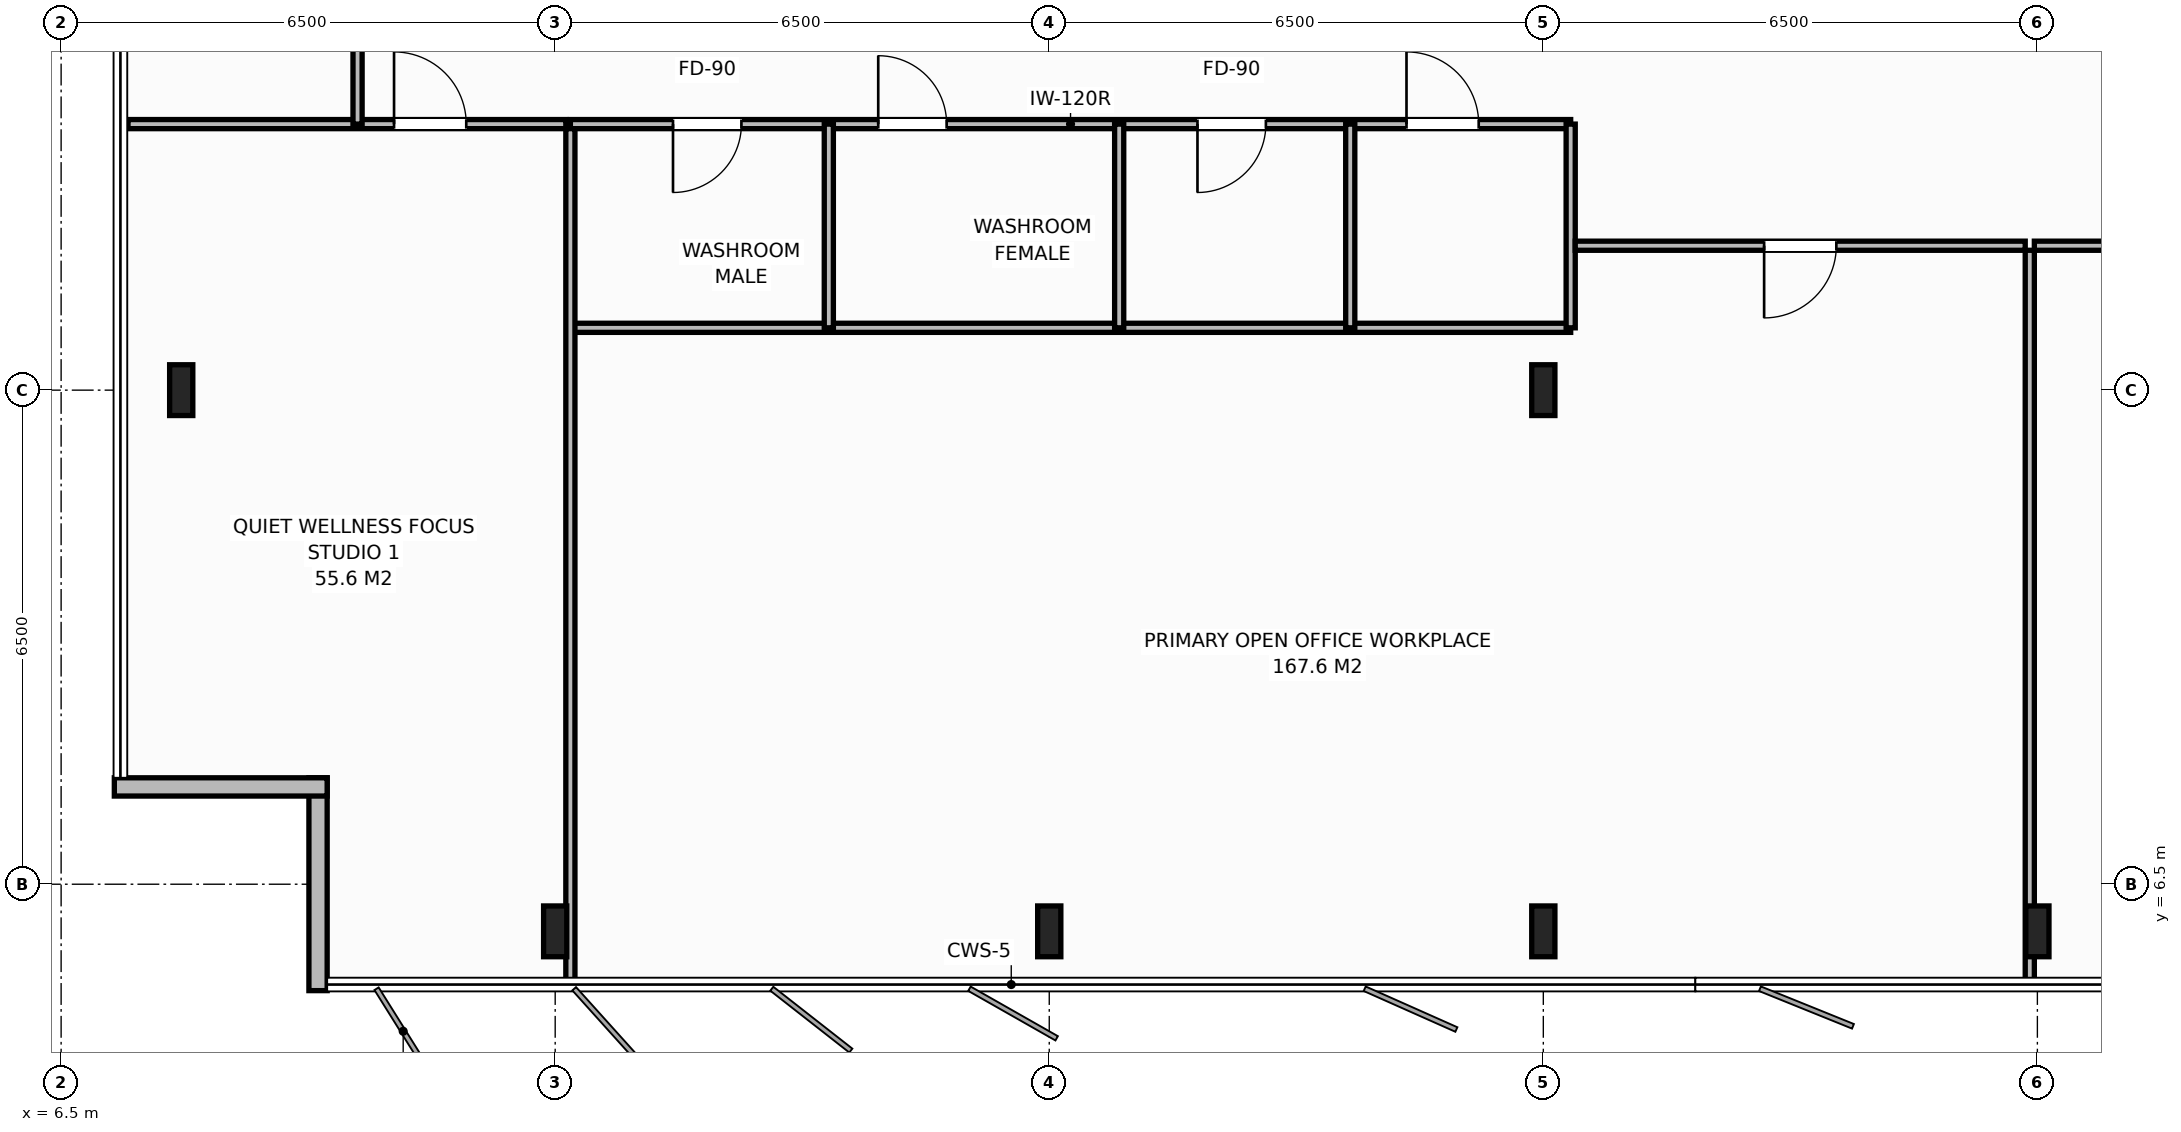
"""IFC4 building model, lengths in metres.
Left out: names, types, materials, properties, quantities, classifications, styles, units other than length and angle.
Written with IfcOpenShell. Run it as: python <this file> out.ifc"""

import sys

from ifc_helpers import new_model, si_unit, direction, frame, frame_2d, origin, origin_2d, place, context, subcontext, project, spatial, rectangle, i_section, extrude, element, fill, save


model = new_model("IFC4")
c1 = context("Model", 3, precision=1e-05, world=origin(), true_north=direction((0.0, 1.0)))
c2 = subcontext(c1, "Body", "Model", "MODEL_VIEW")
j1 = project(units=[si_unit("LENGTHUNIT", "METRE"), si_unit("PLANEANGLEUNIT", "RADIAN")], contexts=[c1])
p1 = place(None, origin())
s1 = spatial("IfcSite", under=j1, at=p1, CompositionType="ELEMENT")
p2 = place(p1, origin())
s2 = spatial("IfcBuilding", under=s1, at=p2, CompositionType="ELEMENT")
p3 = place(p2, frame((0.0, 0.0, 267.0)))
s3 = spatial("IfcBuildingStorey", under=s2, at=p3, CompositionType="ELEMENT", Elevation=267.0)
for number, where, z_axis, x_axis in (
    (1, (26.0, 13.0, 0.0), (0.0, 0.0, 1.0), (1.0, 0.0, 0.0)),
    (2, (13.0, 5.88, 0.0), (0.0, 0.0, 1.0), (1.0, 0.0, 0.0)),
    (3, (19.5, 5.88, 0.0), (0.0, 0.0, 1.0), (1.0, 0.0, 0.0)),
    (4, (26.0, 5.88, 0.0), (0.0, 0.0, 1.0), (1.0, 0.0, 0.0)),
    (5, (32.5, 5.88, 0.0), (0.0, 0.0, 1.0), (1.0, 0.0, 0.0)),
    (6, (8.08, 13.0, 0.0), (0.0, 0.0, 1.0), (1.0, 0.0, 0.0)),
):
    element("IfcColumn", number, at=place(p3, frame(where, z_axis=z_axis, x_axis=x_axis)), inside=s3, PredefinedType="COLUMN", context=c2, shape_type="SweptSolid", body=[
        extrude(i_section(OverallWidth=0.305, OverallDepth=0.668, WebThickness=0.021, FlangeThickness=0.04, at=origin_2d()), origin(), (0.0, 0.0, 1.0), 3.8),
    ])
p4 = place(p3, frame((9.88, 5.1, 0.0), z_axis=(0.0, 0.0, 1.0), x_axis=(0.0, 1.0, 0.0)))
e7 = element("IfcWall", 7, at=p4, inside=s3, PredefinedType="STANDARD", context=c2, shape_type="SweptSolid", body=[
    extrude(rectangle(XDim=2.8, YDim=0.24, at=frame_2d((1.4, 0.0))), origin(), (0.0, 0.0, 1.0), 3.588),
])
p5 = place(p3, frame((10.0, 7.78, 0.0), z_axis=(0.0, 0.0, 1.0), x_axis=(-1.0, 0.0, 0.0)))
e8 = element("IfcWall", 8, at=p5, inside=s3, PredefinedType="STANDARD", context=c2, shape_type="SweptSolid", body=[
    extrude(rectangle(XDim=2.8, YDim=0.24, at=frame_2d((1.4, 0.0))), origin(), (0.0, 0.0, 1.0), 3.588),
])
p6 = place(p3, frame((13.2, 16.5, 0.0), z_axis=(0.0, 0.0, 1.0), x_axis=(1.0, 0.0, 0.0)))
e9 = element("IfcWall", 9, at=p6, inside=s3, PredefinedType="PARTITIONING", context=c2, shape_type="SweptSolid", body=[
    extrude(rectangle(XDim=13.16, YDim=0.12, at=frame_2d((6.58, 0.0))), origin(), (0.0, 0.0, 1.0), 3.588),
])
p7 = place(p6, frame((1.35, 0.0, 0.0)))
e10 = element("IfcOpeningElement", 10, at=p7, cuts=e9, PredefinedType="OPENING", context=c2, shape_type="SweptSolid", body=[
    extrude(rectangle(XDim=0.9, YDim=2.15, at=frame_2d((0.45, 1.075))), frame((0.0, 0.07, 0.0), z_axis=(0.0, -1.0, 0.0), x_axis=(1.0, 0.0, 0.0)), (0.0, 0.0, 1.0), 0.14),
])
p8 = place(p6, frame((4.05, 0.0, 0.0)))
e11 = element("IfcOpeningElement", 11, at=p8, cuts=e9, PredefinedType="OPENING", context=c2, shape_type="SweptSolid", body=[
    extrude(rectangle(XDim=0.9, YDim=2.15, at=frame_2d((0.45, 1.075))), frame((0.0, 0.07, 0.0), z_axis=(0.0, -1.0, 0.0), x_axis=(1.0, 0.0, 0.0)), (0.0, 0.0, 1.0), 0.14),
])
p9 = place(p6, frame((8.25, 0.0, 0.0)))
e12 = element("IfcOpeningElement", 12, at=p9, cuts=e9, PredefinedType="OPENING", context=c2, shape_type="SweptSolid", body=[
    extrude(rectangle(XDim=0.9, YDim=2.15, at=frame_2d((0.45, 1.075))), frame((0.0, 0.07, 0.0), z_axis=(0.0, -1.0, 0.0), x_axis=(1.0, 0.0, 0.0)), (0.0, 0.0, 1.0), 0.14),
])
p10 = place(p6, frame((11.0, 0.0, 0.0)))
e13 = element("IfcOpeningElement", 13, at=p10, cuts=e9, PredefinedType="OPENING", context=c2, shape_type="SweptSolid", body=[
    extrude(rectangle(XDim=0.95, YDim=2.15, at=frame_2d((0.475, 1.075))), frame((0.0, 0.07, 0.0), z_axis=(0.0, -1.0, 0.0), x_axis=(1.0, 0.0, 0.0)), (0.0, 0.0, 1.0), 0.14),
])
p11 = place(p3, frame((13.2, 13.82, 0.0), z_axis=(0.0, 0.0, 1.0), x_axis=(1.0, 0.0, 0.0)))
e14 = element("IfcWall", 14, at=p11, inside=s3, PredefinedType="PARTITIONING", context=c2, shape_type="SweptSolid", body=[
    extrude(rectangle(XDim=13.16, YDim=0.12, at=frame_2d((6.58, 0.0))), origin(), (0.0, 0.0, 1.0), 3.588),
])
for number, where, z_axis, x_axis in (
    (15, (16.6, 13.82, 0.0), (0.0, 0.0, 1.0), (0.0, 1.0, 0.0)),
    (16, (20.42, 13.82, 0.0), (0.0, 0.0, 1.0), (0.0, 1.0, 0.0)),
    (17, (23.46, 13.82, 0.0), (0.0, 0.0, 1.0), (0.0, 1.0, 0.0)),
    (18, (26.36, 13.82, 0.0), (0.0, 0.0, 1.0), (0.0, 1.0, 0.0)),
):
    element("IfcWall", number, at=place(p3, frame(where, z_axis=z_axis, x_axis=x_axis)), inside=s3, PredefinedType="PARTITIONING", context=c2, shape_type="SweptSolid", body=[
        extrude(rectangle(XDim=2.68, YDim=0.12, at=frame_2d((1.34, 0.0))), origin(), (0.0, 0.0, 1.0), 3.588),
    ])
p12 = place(p3, frame((13.2, 5.12, 0.0), z_axis=(0.0, 0.0, 1.0), x_axis=(0.0, 1.0, 0.0)))
e19 = element("IfcWall", 19, at=p12, inside=s3, PredefinedType="PARTITIONING", context=c2, shape_type="SweptSolid", body=[
    extrude(rectangle(XDim=11.32, YDim=0.12, at=frame_2d((5.66, 0.0))), origin(), (0.0, 0.0, 1.0), 2.788),
])
p13 = place(p3, frame((7.38, 16.5, 0.0), z_axis=(0.0, 0.0, 1.0), x_axis=(1.0, 0.0, 0.0)))
e20 = element("IfcWall", 20, at=p13, inside=s3, PredefinedType="PARTITIONING", context=c2, shape_type="SweptSolid", body=[
    extrude(rectangle(XDim=5.76, YDim=0.12, at=frame_2d((2.88, 0.0))), origin(), (0.0, 0.0, 1.0), 3.588),
])
p14 = place(p13, frame((3.5, 0.0, 0.0)))
e21 = element("IfcOpeningElement", 21, at=p14, cuts=e20, PredefinedType="OPENING", context=c2, shape_type="SweptSolid", body=[
    extrude(rectangle(XDim=0.95, YDim=2.15, at=frame_2d((0.475, 1.075))), frame((0.0, 0.07, 0.0), z_axis=(0.0, -1.0, 0.0), x_axis=(1.0, 0.0, 0.0)), (0.0, 0.0, 1.0), 0.14),
])
p15 = place(p3, frame((32.4, 5.12, 0.0), z_axis=(0.0, 0.0, 1.0), x_axis=(0.0, 1.0, 0.0)))
e22 = element("IfcWall", 22, at=p15, inside=s3, PredefinedType="PARTITIONING", context=c2, shape_type="SweptSolid", body=[
    extrude(rectangle(XDim=9.72, YDim=0.12, at=frame_2d((4.86, 0.0))), origin(), (0.0, 0.0, 1.0), 2.788),
])
p16 = place(p3, frame((26.42, 14.9, 0.0), z_axis=(0.0, 0.0, 1.0), x_axis=(1.0, 0.0, 0.0)))
e23 = element("IfcWall", 23, at=p16, inside=s3, PredefinedType="PARTITIONING", context=c2, shape_type="SweptSolid", body=[
    extrude(rectangle(XDim=5.92, YDim=0.12, at=frame_2d((2.96, 0.0))), origin(), (0.0, 0.0, 1.0), 3.588),
])
p17 = place(p16, frame((2.485, 0.0, 0.0)))
e24 = element("IfcOpeningElement", 24, at=p17, cuts=e23, PredefinedType="OPENING", context=c2, shape_type="SweptSolid", body=[
    extrude(rectangle(XDim=0.95, YDim=2.15, at=frame_2d((0.475, 1.075))), frame((0.0, 0.07, 0.0), z_axis=(0.0, -1.0, 0.0), x_axis=(1.0, 0.0, 0.0)), (0.0, 0.0, 1.0), 0.14),
])
p18 = place(p3, frame((32.46, 14.9, 0.0), z_axis=(0.0, 0.0, 1.0), x_axis=(1.0, 0.0, 0.0)))
e25 = element("IfcWall", 25, at=p18, inside=s3, PredefinedType="PARTITIONING", context=c2, shape_type="SweptSolid", body=[
    extrude(rectangle(XDim=3.445, YDim=0.12, at=frame_2d((1.722, 0.0))), origin(), (0.0, 0.0, 1.0), 3.588),
])
p19 = place(p18, frame((1.247, 0.0, 0.0)))
e26 = element("IfcOpeningElement", 26, at=p19, cuts=e25, PredefinedType="OPENING", context=c2, shape_type="SweptSolid", body=[
    extrude(rectangle(XDim=0.95, YDim=2.15, at=frame_2d((0.475, 1.075))), frame((0.0, 0.07, 0.0), z_axis=(0.0, -1.0, 0.0), x_axis=(1.0, 0.0, 0.0)), (0.0, 0.0, 1.0), 0.14),
])
p20 = place(p3, frame((10.4, 16.5, 0.0), z_axis=(0.0, 0.0, 1.0), x_axis=(0.0, 1.0, 0.0)))
e27 = element("IfcWall", 27, at=p20, inside=s3, PredefinedType="PARTITIONING", context=c2, shape_type="SweptSolid", body=[
    extrude(rectangle(XDim=19.0, YDim=0.12, at=frame_2d((9.5, 0.0))), origin(), (0.0, 0.0, 1.0), 3.588),
])
p21 = place(p20, frame((9.025, 0.0, 0.0)))
e28 = element("IfcOpeningElement", 28, at=p21, cuts=e27, PredefinedType="OPENING", context=c2, shape_type="SweptSolid", body=[
    extrude(rectangle(XDim=0.95, YDim=2.15, at=frame_2d((0.475, 1.075))), frame((0.0, 0.07, 0.0), z_axis=(0.0, -1.0, 0.0), x_axis=(1.0, 0.0, 0.0)), (0.0, 0.0, 1.0), 0.14),
])
p22 = place(p7, origin())
e29 = element("IfcDoor", 29, at=p22, inside=s3, OperationType="SINGLE_SWING_RIGHT", PredefinedType="DOOR", context=c2, shape_type="SweptSolid", body=[
    extrude(rectangle(XDim=0.9, YDim=2.15, at=frame_2d((0.45, 1.075))), frame((0.0, 0.025, 0.0), z_axis=(0.0, -1.0, 0.0), x_axis=(1.0, 0.0, 0.0)), (0.0, 0.0, 1.0), 0.05),
])
fill(e10, e29)
p23 = place(p8, origin())
e30 = element("IfcDoor", 30, at=p23, inside=s3, OperationType="SINGLE_SWING_LEFT", PredefinedType="DOOR", context=c2, shape_type="SweptSolid", body=[
    extrude(rectangle(XDim=0.9, YDim=2.15, at=frame_2d((0.45, 1.075))), frame((0.0, 0.025, 0.0), z_axis=(0.0, -1.0, 0.0), x_axis=(1.0, 0.0, 0.0)), (0.0, 0.0, 1.0), 0.05),
])
fill(e11, e30)
p24 = place(p9, origin())
e31 = element("IfcDoor", 31, at=p24, inside=s3, OperationType="SINGLE_SWING_RIGHT", PredefinedType="DOOR", context=c2, shape_type="SweptSolid", body=[
    extrude(rectangle(XDim=0.9, YDim=2.15, at=frame_2d((0.45, 1.075))), frame((0.0, 0.025, 0.0), z_axis=(0.0, -1.0, 0.0), x_axis=(1.0, 0.0, 0.0)), (0.0, 0.0, 1.0), 0.05),
])
fill(e12, e31)
p25 = place(p10, origin())
e32 = element("IfcDoor", 32, at=p25, inside=s3, OperationType="SINGLE_SWING_LEFT", PredefinedType="DOOR", context=c2, shape_type="SweptSolid", body=[
    extrude(rectangle(XDim=0.95, YDim=2.15, at=frame_2d((0.475, 1.075))), frame((0.0, 0.025, 0.0), z_axis=(0.0, -1.0, 0.0), x_axis=(1.0, 0.0, 0.0)), (0.0, 0.0, 1.0), 0.05),
])
fill(e13, e32)
p26 = place(p14, origin())
e33 = element("IfcDoor", 33, at=p26, inside=s3, OperationType="SINGLE_SWING_LEFT", PredefinedType="DOOR", context=c2, shape_type="SweptSolid", body=[
    extrude(rectangle(XDim=0.95, YDim=2.15, at=frame_2d((0.475, 1.075))), frame((0.0, 0.025, 0.0), z_axis=(0.0, -1.0, 0.0), x_axis=(1.0, 0.0, 0.0)), (0.0, 0.0, 1.0), 0.05),
])
fill(e21, e33)
p27 = place(p17, origin())
e34 = element("IfcDoor", 34, at=p27, inside=s3, OperationType="SINGLE_SWING_RIGHT", PredefinedType="DOOR", context=c2, shape_type="SweptSolid", body=[
    extrude(rectangle(XDim=0.95, YDim=2.15, at=frame_2d((0.475, 1.075))), frame((0.0, 0.025, 0.0), z_axis=(0.0, -1.0, 0.0), x_axis=(1.0, 0.0, 0.0)), (0.0, 0.0, 1.0), 0.05),
])
fill(e24, e34)
save(model, sys.argv[1])
